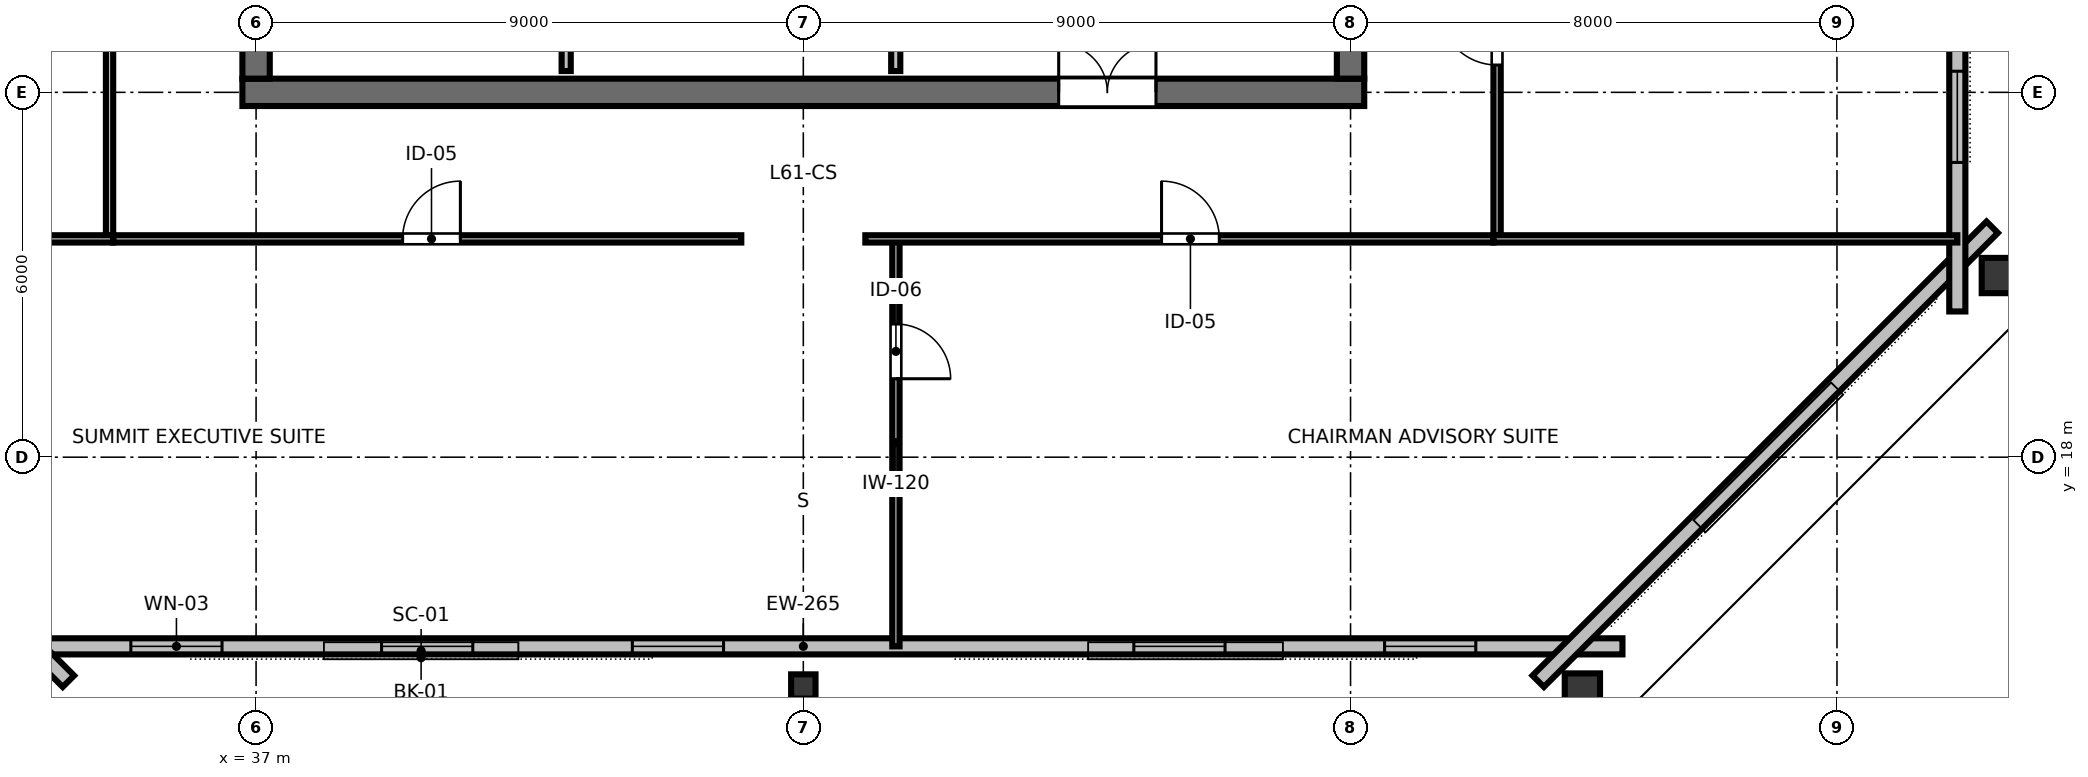
"""IFC4 building model, lengths in metres.
Left out: names, types, materials, properties, quantities, classifications, styles, units other than length and angle.
Written with IfcOpenShell. Run it as: python <this file> out.ifc"""

import sys

from ifc_helpers import new_model, si_unit, direction, frame, frame_2d, origin, origin_2d, place, context, subcontext, project, spatial, rectangle, hollow_rectangle, i_section, extrude, element, fill, save


model = new_model("IFC4")
c1 = context("Model", 3, precision=1e-05, world=origin(), true_north=direction((0.0, 1.0)))
c2 = subcontext(c1, "Body", "Model", "MODEL_VIEW")
j1 = project(units=[si_unit("LENGTHUNIT", "METRE"), si_unit("PLANEANGLEUNIT", "RADIAN")], contexts=[c1])
p1 = place(None, origin())
s1 = spatial("IfcSite", under=j1, at=p1, CompositionType="ELEMENT")
p2 = place(p1, origin())
s2 = spatial("IfcBuilding", under=s1, at=p2, CompositionType="ELEMENT")
p3 = place(p2, frame((0.0, 0.0, 231.0)))
s3 = spatial("IfcBuildingStorey", under=s2, at=p3, CompositionType="ELEMENT", Elevation=231.0)
p4 = place(p3, frame((36.775, 24.0, 0.0), z_axis=(0.0, 0.0, 1.0), x_axis=(1.0, 0.0, 0.0)))
e1 = element("IfcWall", 1, at=p4, inside=s3, PredefinedType="SHEAR", context=c2, shape_type="SweptSolid", body=[
    extrude(rectangle(XDim=18.45, YDim=0.45, at=frame_2d((9.225, 0.0))), origin(), (0.0, 0.0, 1.0), 3.28),
])
p5 = place(p4, frame((13.425, 0.0, 0.0)))
e2 = element("IfcOpeningElement", 2, at=p5, cuts=e1, PredefinedType="OPENING", context=c2, shape_type="SweptSolid", body=[
    extrude(rectangle(XDim=1.6, YDim=2.15, at=frame_2d((0.8, 1.075))), frame((0.0, 0.235, 0.0), z_axis=(0.0, -1.0, 0.0), x_axis=(1.0, 0.0, 0.0)), (0.0, 0.0, 1.0), 0.47),
])
p6 = place(p3, frame((37.0, 24.225, 0.0), z_axis=(0.0, 0.0, 1.0), x_axis=(0.0, 1.0, 0.0)))
e3 = element("IfcWall", 3, at=p6, inside=s3, PredefinedType="SHEAR", context=c2, shape_type="SweptSolid", body=[
    extrude(rectangle(XDim=15.55, YDim=0.45, at=frame_2d((7.775, 0.0))), origin(), (0.0, 0.0, 1.0), 3.28),
])
p7 = place(p6, frame((5.3, 0.0, 0.0)))
e4 = element("IfcOpeningElement", 4, at=p7, cuts=e3, PredefinedType="OPENING", context=c2, shape_type="SweptSolid", body=[
    extrude(rectangle(XDim=1.15, YDim=2.15, at=frame_2d((0.575, 1.075))), frame((0.0, 0.235, 0.0), z_axis=(0.0, -1.0, 0.0), x_axis=(1.0, 0.0, 0.0)), (0.0, 0.0, 1.0), 0.47),
])
p8 = place(p3, frame((55.0, 24.225, 0.0), z_axis=(0.0, 0.0, 1.0), x_axis=(0.0, 1.0, 0.0)))
e5 = element("IfcWall", 5, at=p8, inside=s3, PredefinedType="SHEAR", context=c2, shape_type="SweptSolid", body=[
    extrude(rectangle(XDim=15.55, YDim=0.45, at=frame_2d((7.775, 0.0))), origin(), (0.0, 0.0, 1.0), 3.28),
])
p9 = place(p8, frame((5.3, 0.0, 0.0)))
e6 = element("IfcOpeningElement", 6, at=p9, cuts=e5, PredefinedType="OPENING", context=c2, shape_type="SweptSolid", body=[
    extrude(rectangle(XDim=1.15, YDim=2.15, at=frame_2d((0.575, 1.075))), frame((0.0, 0.235, 0.0), z_axis=(0.0, -1.0, 0.0), x_axis=(1.0, 0.0, 0.0)), (0.0, 0.0, 1.0), 0.47),
])
p10 = place(p3, frame((33.187, 14.094, 0.0), z_axis=(0.072351164075, 0.044894824887, 0.996368287209), x_axis=(-0.527254388164, 0.849707485057, 0.0)))
e7 = element("IfcColumn", 7, at=p10, inside=s3, PredefinedType="COLUMN", context=c2, shape_type="SweptSolid", body=[
    extrude(hollow_rectangle(XDim=0.58, YDim=0.7, WallThickness=0.032, at=origin_2d()), origin(), (0.0, 0.0, 1.0), 3.29),
])
p11 = place(p3, frame((46.0, 14.229, 0.0), z_axis=(0.0, 0.04434450837, 0.999016298454), x_axis=(-1.0, 0.0, 0.0)))
e8 = element("IfcColumn", 8, at=p11, inside=s3, PredefinedType="COLUMN", context=c2, shape_type="SweptSolid", body=[
    extrude(i_section(OverallWidth=0.401, OverallDepth=0.399, WebThickness=0.025, FlangeThickness=0.04, FilletRadius=0.025, at=origin_2d()), origin(), (0.0, 0.0, 1.0), 3.281),
])
p12 = place(p3, frame((58.813, 14.094, 0.0), z_axis=(-0.072351164075, 0.044894824887, 0.996368287209), x_axis=(-0.527254388164, -0.849707485057, 0.0)))
e9 = element("IfcColumn", 9, at=p12, inside=s3, PredefinedType="COLUMN", context=c2, shape_type="SweptSolid", body=[
    extrude(hollow_rectangle(XDim=0.58, YDim=0.7, WallThickness=0.032, at=origin_2d()), origin(), (0.0, 0.0, 1.0), 3.29),
])
p13 = place(p3, frame((65.73, 20.987, 0.0), z_axis=(-0.062492571187, 0.054773773796, 0.996541274735), x_axis=(0.749422115547, -0.656856913627, 0.083099264433)))
e10 = element("IfcColumn", 10, at=p13, inside=s3, PredefinedType="COLUMN", context=c2, shape_type="SweptSolid", body=[
    extrude(hollow_rectangle(XDim=0.58, YDim=0.7, WallThickness=0.032, at=origin_2d()), origin(), (0.0, 0.0, 1.0), 3.29),
])
p14 = place(p3, frame((32.528, 14.889, 0.0), z_axis=(0.0, 0.0, 1.0), x_axis=(1.0, 0.0, 0.0)))
e11 = element("IfcWall", 11, at=p14, inside=s3, PredefinedType="STANDARD", context=c2, shape_type="SweptSolid", body=[
    extrude(rectangle(XDim=26.943, YDim=0.265, at=frame_2d((13.472, 0.0))), origin(), (0.0, 0.0, 1.0), 3.28),
])
p15 = place(p14, frame((2.412, 0.0, 0.85)))
e12 = element("IfcOpeningElement", 12, at=p15, cuts=e11, PredefinedType="OPENING", context=c2, shape_type="SweptSolid", body=[
    extrude(rectangle(XDim=1.5, YDim=1.85, at=frame_2d((0.75, 0.925))), frame((0.0, 0.142, 0.0), z_axis=(0.0, -1.0, 0.0), x_axis=(1.0, 0.0, 0.0)), (0.0, 0.0, 1.0), 0.285),
])
p16 = place(p14, frame((6.536, 0.0, 0.85)))
e13 = element("IfcOpeningElement", 13, at=p16, cuts=e11, PredefinedType="OPENING", context=c2, shape_type="SweptSolid", body=[
    extrude(rectangle(XDim=1.5, YDim=1.85, at=frame_2d((0.75, 0.925))), frame((0.0, 0.142, 0.0), z_axis=(0.0, -1.0, 0.0), x_axis=(1.0, 0.0, 0.0)), (0.0, 0.0, 1.0), 0.285),
])
p17 = place(p14, frame((10.66, 0.0, 0.85)))
e14 = element("IfcOpeningElement", 14, at=p17, cuts=e11, PredefinedType="OPENING", context=c2, shape_type="SweptSolid", body=[
    extrude(rectangle(XDim=1.5, YDim=1.85, at=frame_2d((0.75, 0.925))), frame((0.0, 0.142, 0.0), z_axis=(0.0, -1.0, 0.0), x_axis=(1.0, 0.0, 0.0)), (0.0, 0.0, 1.0), 0.285),
])
p18 = place(p14, frame((18.908, 0.0, 0.85)))
e15 = element("IfcOpeningElement", 15, at=p18, cuts=e11, PredefinedType="OPENING", context=c2, shape_type="SweptSolid", body=[
    extrude(rectangle(XDim=1.5, YDim=1.85, at=frame_2d((0.75, 0.925))), frame((0.0, 0.142, 0.0), z_axis=(0.0, -1.0, 0.0), x_axis=(1.0, 0.0, 0.0)), (0.0, 0.0, 1.0), 0.285),
])
p19 = place(p14, frame((23.031, 0.0, 0.85)))
e16 = element("IfcOpeningElement", 16, at=p19, cuts=e11, PredefinedType="OPENING", context=c2, shape_type="SweptSolid", body=[
    extrude(rectangle(XDim=1.5, YDim=1.85, at=frame_2d((0.75, 0.925))), frame((0.0, 0.142, 0.0), z_axis=(0.0, -1.0, 0.0), x_axis=(1.0, 0.0, 0.0)), (0.0, 0.0, 1.0), 0.285),
])
p20 = place(p3, frame((58.086, 14.315, 0.0), z_axis=(0.0, 0.0, 1.0), x_axis=(0.707106781187, 0.707106781187, 0.0)))
e17 = element("IfcWall", 17, at=p20, inside=s3, PredefinedType="STANDARD", context=c2, shape_type="SweptSolid", body=[
    extrude(rectangle(XDim=10.56, YDim=0.265, at=frame_2d((5.28, 0.0))), origin(), (0.0, 0.0, 1.0), 2.343),
])
p21 = place(p3, frame((64.979, 20.396, 0.0), z_axis=(0.0, 0.0, 1.0), x_axis=(0.0, 1.0, 0.0)))
e18 = element("IfcWall", 18, at=p21, inside=s3, PredefinedType="STANDARD", context=c2, shape_type="SweptSolid", body=[
    extrude(rectangle(XDim=23.207, YDim=0.265, at=frame_2d((11.604, 0.0))), origin(), (0.0, 0.0, 1.0), 3.28),
])
p22 = place(p21, frame((2.451, 0.0, 0.85)))
e19 = element("IfcOpeningElement", 19, at=p22, cuts=e18, PredefinedType="OPENING", context=c2, shape_type="SweptSolid", body=[
    extrude(rectangle(XDim=1.5, YDim=1.85, at=frame_2d((0.75, 0.925))), frame((0.0, 0.142, 0.0), z_axis=(0.0, -1.0, 0.0), x_axis=(1.0, 0.0, 0.0)), (0.0, 0.0, 1.0), 0.285),
])
p23 = place(p21, frame((15.055, 0.0, 0.85)))
e20 = element("IfcOpeningElement", 20, at=p23, cuts=e18, PredefinedType="OPENING", context=c2, shape_type="SweptSolid", body=[
    extrude(rectangle(XDim=1.5, YDim=1.85, at=frame_2d((0.75, 0.925))), frame((0.0, 0.142, 0.0), z_axis=(0.0, -1.0, 0.0), x_axis=(1.0, 0.0, 0.0)), (0.0, 0.0, 1.0), 0.285),
])
p24 = place(p21, frame((19.257, 0.0, 0.85)))
e21 = element("IfcOpeningElement", 21, at=p24, cuts=e18, PredefinedType="OPENING", context=c2, shape_type="SweptSolid", body=[
    extrude(rectangle(XDim=1.5, YDim=1.85, at=frame_2d((0.75, 0.925))), frame((0.0, 0.142, 0.0), z_axis=(0.0, -1.0, 0.0), x_axis=(1.0, 0.0, 0.0)), (0.0, 0.0, 1.0), 0.285),
])
p25 = place(p3, frame((26.447, 21.782, 0.0), z_axis=(0.0, 0.0, 1.0), x_axis=(0.707106781187, -0.707106781187, 0.0)))
e22 = element("IfcWall", 22, at=p25, inside=s3, PredefinedType="STANDARD", context=c2, shape_type="SweptSolid", body=[
    extrude(rectangle(XDim=10.56, YDim=0.265, at=frame_2d((5.28, 0.0))), origin(), (0.0, 0.0, 1.0), 2.343),
])
p26 = place(p3, frame((42.1, 24.35, 0.0), z_axis=(0.0, 0.0, 1.0), x_axis=(0.0, 1.0, 0.0)))
e23 = element("IfcWall", 23, at=p26, inside=s3, PredefinedType="PARTITIONING", context=c2, shape_type="SweptSolid", body=[
    extrude(rectangle(XDim=3.9, YDim=0.15, at=frame_2d((1.95, 0.0))), origin(), (0.0, 0.0, 1.0), 3.28),
])
p27 = place(p26, frame((1.5, 0.0, 0.0)))
e24 = element("IfcOpeningElement", 24, at=p27, cuts=e23, PredefinedType="OPENING", context=c2, shape_type="SweptSolid", body=[
    extrude(rectangle(XDim=0.9, YDim=2.15, at=frame_2d((0.45, 1.075))), frame((0.0, 0.085, 0.0), z_axis=(0.0, -1.0, 0.0), x_axis=(1.0, 0.0, 0.0)), (0.0, 0.0, 1.0), 0.17),
])
p28 = place(p3, frame((47.52, 24.35, 0.0), z_axis=(0.0, 0.0, 1.0), x_axis=(0.0, 1.0, 0.0)))
e25 = element("IfcWall", 25, at=p28, inside=s3, PredefinedType="PARTITIONING", context=c2, shape_type="SweptSolid", body=[
    extrude(rectangle(XDim=3.9, YDim=0.15, at=frame_2d((1.95, 0.0))), origin(), (0.0, 0.0, 1.0), 3.28),
])
p29 = place(p28, frame((0.35, 0.0, 0.0)))
e26 = element("IfcOpeningElement", 26, at=p29, cuts=e25, PredefinedType="OPENING", context=c2, shape_type="SweptSolid", body=[
    extrude(rectangle(XDim=0.9, YDim=2.15, at=frame_2d((0.45, 1.075))), frame((0.0, 0.085, 0.0), z_axis=(0.0, -1.0, 0.0), x_axis=(1.0, 0.0, 0.0)), (0.0, 0.0, 1.0), 0.17),
])
p30 = place(p3, frame((47.523, 21.59, 0.0), z_axis=(0.0, 0.0, 1.0), x_axis=(0.0, -1.0, 0.0)))
e27 = element("IfcWall", 27, at=p30, inside=s3, PredefinedType="PARTITIONING", context=c2, shape_type="SweptSolid", body=[
    extrude(rectangle(XDim=6.701, YDim=0.12, at=frame_2d((3.351, 0.0))), origin(), (0.0, 0.0, 1.0), 2.56),
])
p31 = place(p30, frame((1.4, 0.0, 0.0)))
e28 = element("IfcOpeningElement", 28, at=p31, cuts=e27, PredefinedType="OPENING", context=c2, shape_type="SweptSolid", body=[
    extrude(rectangle(XDim=0.9, YDim=2.15, at=frame_2d((0.45, 1.075))), frame((0.0, 0.07, 0.0), z_axis=(0.0, -1.0, 0.0), x_axis=(1.0, 0.0, 0.0)), (0.0, 0.0, 1.0), 0.14),
])
p32 = place(p3, frame((34.65, 21.59, 0.0), z_axis=(0.0, 0.0, 1.0), x_axis=(1.0, 0.0, 0.0)))
e29 = element("IfcWall", 29, at=p32, inside=s3, PredefinedType="PARTITIONING", context=c2, shape_type="SweptSolid", body=[
    extrude(rectangle(XDim=10.33, YDim=0.12, at=frame_2d((5.165, 0.0))), origin(), (0.0, 0.0, 1.0), 2.56),
])
p33 = place(p32, frame((4.76, 0.0, 0.0)))
e30 = element("IfcOpeningElement", 30, at=p33, cuts=e29, PredefinedType="OPENING", context=c2, shape_type="SweptSolid", body=[
    extrude(rectangle(XDim=0.95, YDim=2.15, at=frame_2d((0.475, 1.075))), frame((0.0, 0.07, 0.0), z_axis=(0.0, -1.0, 0.0), x_axis=(1.0, 0.0, 0.0)), (0.0, 0.0, 1.0), 0.14),
])
p34 = place(p3, frame((47.02, 21.59, 0.0), z_axis=(0.0, 0.0, 1.0), x_axis=(1.0, 0.0, 0.0)))
e31 = element("IfcWall", 31, at=p34, inside=s3, PredefinedType="PARTITIONING", context=c2, shape_type="SweptSolid", body=[
    extrude(rectangle(XDim=10.33, YDim=0.12, at=frame_2d((5.165, 0.0))), origin(), (0.0, 0.0, 1.0), 2.56),
])
p35 = place(p34, frame((4.872, 0.0, 0.0)))
e32 = element("IfcOpeningElement", 32, at=p35, cuts=e31, PredefinedType="OPENING", context=c2, shape_type="SweptSolid", body=[
    extrude(rectangle(XDim=0.95, YDim=2.15, at=frame_2d((0.475, 1.075))), frame((0.0, 0.07, 0.0), z_axis=(0.0, -1.0, 0.0), x_axis=(1.0, 0.0, 0.0)), (0.0, 0.0, 1.0), 0.14),
])
p36 = place(p3, frame((34.59, 21.65, 0.0), z_axis=(0.0, 0.0, 1.0), x_axis=(0.0, 1.0, 0.0)))
e33 = element("IfcWall", 33, at=p36, inside=s3, PredefinedType="PARTITIONING", context=c2, shape_type="SweptSolid", body=[
    extrude(rectangle(XDim=20.7, YDim=0.12, at=frame_2d((10.35, 0.0))), origin(), (0.0, 0.0, 1.0), 2.56),
])
p37 = place(p36, frame((3.682, 0.0, 0.0)))
e34 = element("IfcOpeningElement", 34, at=p37, cuts=e33, PredefinedType="OPENING", context=c2, shape_type="SweptSolid", body=[
    extrude(rectangle(XDim=0.95, YDim=2.15, at=frame_2d((0.475, 1.075))), frame((0.0, 0.07, 0.0), z_axis=(0.0, -1.0, 0.0), x_axis=(1.0, 0.0, 0.0)), (0.0, 0.0, 1.0), 0.14),
])
p38 = place(p36, frame((13.832, 0.0, 0.0)))
e35 = element("IfcOpeningElement", 35, at=p38, cuts=e33, PredefinedType="OPENING", context=c2, shape_type="SweptSolid", body=[
    extrude(rectangle(XDim=0.95, YDim=2.15, at=frame_2d((0.475, 1.075))), frame((0.0, 0.07, 0.0), z_axis=(0.0, -1.0, 0.0), x_axis=(1.0, 0.0, 0.0)), (0.0, 0.0, 1.0), 0.14),
])
p39 = place(p3, frame((57.41, 21.65, 0.0), z_axis=(0.0, 0.0, 1.0), x_axis=(0.0, 1.0, 0.0)))
e36 = element("IfcWall", 36, at=p39, inside=s3, PredefinedType="PARTITIONING", context=c2, shape_type="SweptSolid", body=[
    extrude(rectangle(XDim=20.7, YDim=0.12, at=frame_2d((10.35, 0.0))), origin(), (0.0, 0.0, 1.0), 2.56),
])
p40 = place(p39, frame((2.799, 0.0, 0.0)))
e37 = element("IfcOpeningElement", 37, at=p40, cuts=e36, PredefinedType="OPENING", context=c2, shape_type="SweptSolid", body=[
    extrude(rectangle(XDim=0.95, YDim=2.15, at=frame_2d((0.475, 1.075))), frame((0.0, 0.07, 0.0), z_axis=(0.0, -1.0, 0.0), x_axis=(1.0, 0.0, 0.0)), (0.0, 0.0, 1.0), 0.14),
])
p41 = place(p39, frame((8.187, 0.0, 0.0)))
e38 = element("IfcOpeningElement", 38, at=p41, cuts=e36, PredefinedType="OPENING", context=c2, shape_type="SweptSolid", body=[
    extrude(rectangle(XDim=0.95, YDim=2.15, at=frame_2d((0.475, 1.075))), frame((0.0, 0.07, 0.0), z_axis=(0.0, -1.0, 0.0), x_axis=(1.0, 0.0, 0.0)), (0.0, 0.0, 1.0), 0.14),
])
p42 = place(p39, frame((15.263, 0.0, 0.0)))
e39 = element("IfcOpeningElement", 39, at=p42, cuts=e36, PredefinedType="OPENING", context=c2, shape_type="SweptSolid", body=[
    extrude(rectangle(XDim=0.95, YDim=2.15, at=frame_2d((0.475, 1.075))), frame((0.0, 0.07, 0.0), z_axis=(0.0, -1.0, 0.0), x_axis=(1.0, 0.0, 0.0)), (0.0, 0.0, 1.0), 0.14),
])
for number, where, z_axis, x_axis in (
    (40, (34.65, 21.59, 0.0), (0.0, 0.0, 1.0), (-1.0, 0.0, 0.0)),
    (41, (57.35, 21.59, 0.0), (0.0, 0.0, 1.0), (1.0, 0.0, 0.0)),
):
    element("IfcWall", number, at=place(p3, frame(where, z_axis=z_axis, x_axis=x_axis)), inside=s3, PredefinedType="PARTITIONING", context=c2, shape_type="SweptSolid", body=[
        extrude(rectangle(XDim=7.629, YDim=0.12, at=frame_2d((3.814, 0.0))), origin(), (0.0, 0.0, 1.0), 2.56),
    ])
p43 = place(p15, origin())
e42 = element("IfcWindow", 42, at=p43, inside=s3, PartitioningType="SINGLE_PANEL", PredefinedType="WINDOW", context=c2, shape_type="SweptSolid", body=[
    extrude(rectangle(XDim=1.5, YDim=1.85, at=frame_2d((0.75, 0.925))), frame((0.0, 0.03, 0.0), z_axis=(0.0, -1.0, 0.0), x_axis=(1.0, 0.0, 0.0)), (0.0, 0.0, 1.0), 0.06),
])
fill(e12, e42)
p44 = place(p16, origin())
e43 = element("IfcWindow", 43, at=p44, inside=s3, PartitioningType="SINGLE_PANEL", PredefinedType="WINDOW", context=c2, shape_type="SweptSolid", body=[
    extrude(rectangle(XDim=1.5, YDim=1.85, at=frame_2d((0.75, 0.925))), frame((0.0, 0.03, 0.0), z_axis=(0.0, -1.0, 0.0), x_axis=(1.0, 0.0, 0.0)), (0.0, 0.0, 1.0), 0.06),
])
fill(e13, e43)
p45 = place(p17, origin())
e44 = element("IfcWindow", 44, at=p45, inside=s3, PartitioningType="SINGLE_PANEL", PredefinedType="WINDOW", context=c2, shape_type="SweptSolid", body=[
    extrude(rectangle(XDim=1.5, YDim=1.85, at=frame_2d((0.75, 0.925))), frame((0.0, 0.03, 0.0), z_axis=(0.0, -1.0, 0.0), x_axis=(1.0, 0.0, 0.0)), (0.0, 0.0, 1.0), 0.06),
])
fill(e14, e44)
p46 = place(p18, origin())
e45 = element("IfcWindow", 45, at=p46, inside=s3, PartitioningType="SINGLE_PANEL", PredefinedType="WINDOW", context=c2, shape_type="SweptSolid", body=[
    extrude(rectangle(XDim=1.5, YDim=1.85, at=frame_2d((0.75, 0.925))), frame((0.0, 0.03, 0.0), z_axis=(0.0, -1.0, 0.0), x_axis=(1.0, 0.0, 0.0)), (0.0, 0.0, 1.0), 0.06),
])
fill(e15, e45)
p47 = place(p19, origin())
e46 = element("IfcWindow", 46, at=p47, inside=s3, PartitioningType="SINGLE_PANEL", PredefinedType="WINDOW", context=c2, shape_type="SweptSolid", body=[
    extrude(rectangle(XDim=1.5, YDim=1.85, at=frame_2d((0.75, 0.925))), frame((0.0, 0.03, 0.0), z_axis=(0.0, -1.0, 0.0), x_axis=(1.0, 0.0, 0.0)), (0.0, 0.0, 1.0), 0.06),
])
fill(e16, e46)
p48 = place(p22, origin())
e47 = element("IfcWindow", 47, at=p48, inside=s3, PartitioningType="SINGLE_PANEL", PredefinedType="WINDOW", context=c2, shape_type="SweptSolid", body=[
    extrude(rectangle(XDim=1.5, YDim=1.85, at=frame_2d((0.75, 0.925))), frame((0.0, 0.03, 0.0), z_axis=(0.0, -1.0, 0.0), x_axis=(1.0, 0.0, 0.0)), (0.0, 0.0, 1.0), 0.06),
])
fill(e19, e47)
p49 = place(p5, origin())
e48 = element("IfcDoor", 48, at=p49, inside=s3, OperationType="DOUBLE_DOOR_SINGLE_SWING", PredefinedType="DOOR", context=c2, shape_type="SweptSolid", body=[
    extrude(rectangle(XDim=1.6, YDim=2.15, at=frame_2d((0.8, 1.075))), frame((0.0, 0.025, 0.0), z_axis=(0.0, -1.0, 0.0), x_axis=(1.0, 0.0, 0.0)), (0.0, 0.0, 1.0), 0.05),
])
fill(e2, e48)
p50 = place(p31, origin())
e49 = element("IfcDoor", 49, at=p50, inside=s3, OperationType="SINGLE_SWING_RIGHT", PredefinedType="DOOR", context=c2, shape_type="SweptSolid", body=[
    extrude(rectangle(XDim=0.9, YDim=2.15, at=frame_2d((0.45, 1.075))), frame((0.0, 0.025, 0.0), z_axis=(0.0, -1.0, 0.0), x_axis=(1.0, 0.0, 0.0)), (0.0, 0.0, 1.0), 0.05),
])
fill(e28, e49)
p51 = place(p33, origin())
e50 = element("IfcDoor", 50, at=p51, inside=s3, OperationType="SINGLE_SWING_RIGHT", PredefinedType="DOOR", context=c2, shape_type="SweptSolid", body=[
    extrude(rectangle(XDim=0.95, YDim=2.15, at=frame_2d((0.475, 1.075))), frame((0.0, 0.025, 0.0), z_axis=(0.0, -1.0, 0.0), x_axis=(1.0, 0.0, 0.0)), (0.0, 0.0, 1.0), 0.05),
])
fill(e30, e50)
p52 = place(p35, origin())
e51 = element("IfcDoor", 51, at=p52, inside=s3, OperationType="SINGLE_SWING_LEFT", PredefinedType="DOOR", context=c2, shape_type="SweptSolid", body=[
    extrude(rectangle(XDim=0.95, YDim=2.15, at=frame_2d((0.475, 1.075))), frame((0.0, 0.025, 0.0), z_axis=(0.0, -1.0, 0.0), x_axis=(1.0, 0.0, 0.0)), (0.0, 0.0, 1.0), 0.05),
])
fill(e32, e51)
p53 = place(p40, origin())
e52 = element("IfcDoor", 52, at=p53, inside=s3, OperationType="SINGLE_SWING_RIGHT", PredefinedType="DOOR", context=c2, shape_type="SweptSolid", body=[
    extrude(rectangle(XDim=0.95, YDim=2.15, at=frame_2d((0.475, 1.075))), frame((0.0, 0.025, 0.0), z_axis=(0.0, -1.0, 0.0), x_axis=(1.0, 0.0, 0.0)), (0.0, 0.0, 1.0), 0.05),
])
fill(e37, e52)
save(model, sys.argv[1])
